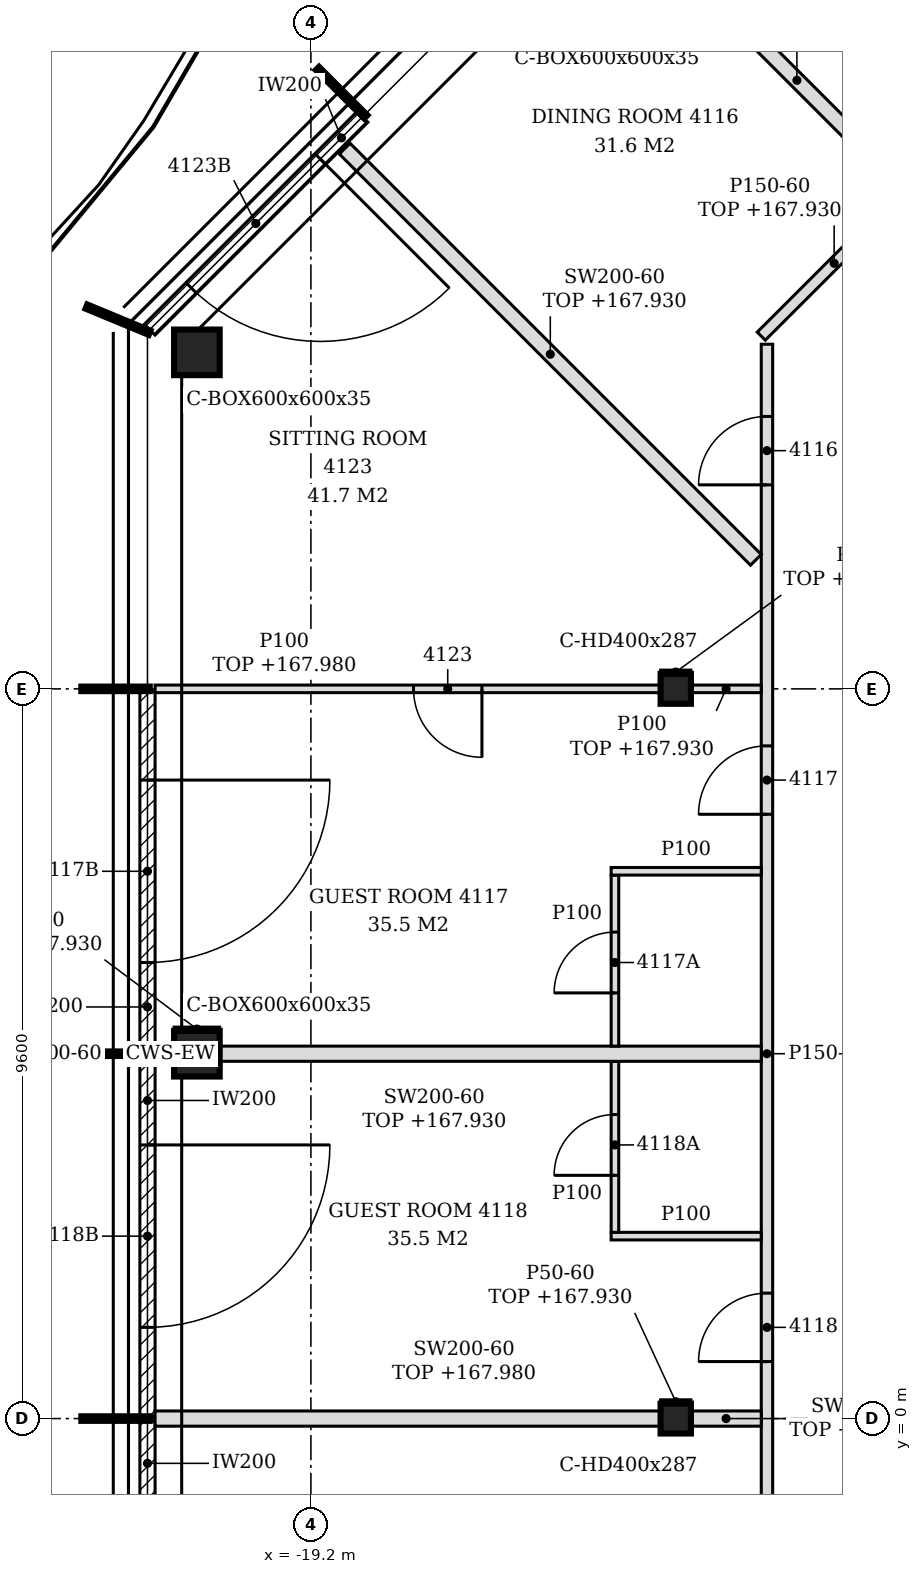
"""IFC4 building model, lengths in metres.
Left out: names, types, materials, properties, quantities, classifications, styles, units other than length and angle.
Written with IfcOpenShell. Run it as: python <this file> out.ifc"""

import sys

from ifc_helpers import new_model, si_unit, direction, frame, frame_2d, origin, origin_2d, place, context, subcontext, project, spatial, polyline, rectangle, hollow_rectangle, i_section, outline, extrude, element, fill, save


model = new_model("IFC4")
c1 = context("Model", 3, precision=1e-05, world=origin(), true_north=direction((0.0, 1.0)))
c2 = subcontext(c1, "Body", "Model", "MODEL_VIEW")
j1 = project(units=[si_unit("LENGTHUNIT", "METRE"), si_unit("PLANEANGLEUNIT", "RADIAN")], contexts=[c1])
p1 = place(None, origin())
s1 = spatial("IfcSite", under=j1, at=p1, CompositionType="ELEMENT")
p2 = place(p1, origin())
s2 = spatial("IfcBuilding", under=s1, at=p2, CompositionType="ELEMENT")
p3 = place(p2, frame((0.0, 0.0, 165.0)))
s3 = spatial("IfcBuildingStorey", under=s2, at=p3, CompositionType="ELEMENT", Elevation=165.0)
for number, where, z_axis, x_axis in (
    (1, (-20.7, 14.027, -0.15), (0.0, 0.0, 1.0), (1.0, 0.0, 0.0)),
    (2, (-20.7, 4.8, -0.15), (0.0, 0.0, 1.0), (1.0, 0.0, 0.0)),
):
    element("IfcColumn", number, at=place(p3, frame(where, z_axis=z_axis, x_axis=x_axis)), inside=s3, PredefinedType="COLUMN", context=c2, shape_type="SweptSolid", body=[
        extrude(hollow_rectangle(XDim=0.6, YDim=0.6, WallThickness=0.035, at=origin_2d()), origin(), (0.0, 0.0, 1.0), 3.6),
    ])
for number, where, z_axis, x_axis in (
    (3, (-14.4, 0.0, -0.15), (0.0, 0.0, 1.0), (1.0, 0.0, 0.0)),
    (4, (-14.4, 9.6, -0.15), (0.0, 0.0, 1.0), (1.0, 0.0, 0.0)),
):
    element("IfcColumn", number, at=place(p3, frame(where, z_axis=z_axis, x_axis=x_axis)), inside=s3, PredefinedType="COLUMN", context=c2, shape_type="SweptSolid", body=[
        extrude(i_section(OverallWidth=0.399, OverallDepth=0.393, WebThickness=0.023, FlangeThickness=0.037, FilletRadius=0.015, at=origin_2d()), origin(), (0.0, 0.0, 1.0), 3.6),
    ])
p4 = place(p3, frame((-18.521, 17.126, 0.0), z_axis=(0.0, 0.0, 1.0), x_axis=(-0.707106781187, -0.707106781187, 0.0)))
e5 = element("IfcWall", 5, at=p4, inside=s3, PredefinedType="NOTDEFINED", context=c2, shape_type="SweptSolid", body=[
    extrude(rectangle(XDim=3.962, YDim=0.2, at=frame_2d((1.981, 0.0))), origin(), (0.0, 0.0, 1.0), 3.45),
])
p5 = place(p4, frame((0.785, 0.0, 0.0)))
e6 = element("IfcOpeningElement", 6, at=p5, cuts=e5, PredefinedType="OPENING", context=c2, shape_type="SweptSolid", body=[
    extrude(rectangle(XDim=2.4, YDim=2.4, at=frame_2d((1.2, 1.2))), frame((0.0, 0.11, 0.0), z_axis=(0.0, -1.0, 0.0), x_axis=(1.0, 0.0, 0.0)), (0.0, 0.0, 1.0), 0.22),
])
p6 = place(p3, frame((-21.35, 9.57, 0.0), z_axis=(0.0, 0.0, 1.0), x_axis=(0.0, -1.0, 0.0)))
e7 = element("IfcWall", 7, at=p6, inside=s3, PredefinedType="NOTDEFINED", context=c2, shape_type="SweptSolid", body=[
    extrude(rectangle(XDim=4.74, YDim=0.2, at=frame_2d((2.37, 0.0))), origin(), (0.0, 0.0, 1.0), 3.45),
])
p7 = place(p6, frame((1.17, 0.0, 0.0)))
e8 = element("IfcOpeningElement", 8, at=p7, cuts=e7, PredefinedType="OPENING", context=c2, shape_type="SweptSolid", body=[
    extrude(rectangle(XDim=2.4, YDim=2.4, at=frame_2d((1.2, 1.2))), frame((0.0, 0.11, 0.0), z_axis=(0.0, -1.0, 0.0), x_axis=(1.0, 0.0, 0.0)), (0.0, 0.0, 1.0), 0.22),
])
p8 = place(p3, frame((-21.35, 4.77, 0.0), z_axis=(0.0, 0.0, 1.0), x_axis=(0.0, -1.0, 0.0)))
e9 = element("IfcWall", 9, at=p8, inside=s3, PredefinedType="NOTDEFINED", context=c2, shape_type="SweptSolid", body=[
    extrude(rectangle(XDim=4.74, YDim=0.2, at=frame_2d((2.37, 0.0))), origin(), (0.0, 0.0, 1.0), 3.45),
])
p9 = place(p8, frame((1.17, 0.0, 0.0)))
e10 = element("IfcOpeningElement", 10, at=p9, cuts=e9, PredefinedType="OPENING", context=c2, shape_type="SweptSolid", body=[
    extrude(rectangle(XDim=2.4, YDim=2.4, at=frame_2d((1.2, 1.2))), frame((0.0, 0.11, 0.0), z_axis=(0.0, -1.0, 0.0), x_axis=(1.0, 0.0, 0.0)), (0.0, 0.0, 1.0), 0.22),
])
p10 = place(p3, frame((-21.35, -0.03, 0.0), z_axis=(0.0, 0.0, 1.0), x_axis=(0.0, -1.0, 0.0)))
e11 = element("IfcWall", 11, at=p10, inside=s3, PredefinedType="NOTDEFINED", context=c2, shape_type="SweptSolid", body=[
    extrude(rectangle(XDim=4.626, YDim=0.2, at=frame_2d((2.313, 0.0))), origin(), (0.0, 0.0, 1.0), 3.45),
])
p11 = place(p10, frame((1.118, 0.0, 0.0)))
e12 = element("IfcOpeningElement", 12, at=p11, cuts=e11, PredefinedType="OPENING", context=c2, shape_type="SweptSolid", body=[
    extrude(rectangle(XDim=2.4, YDim=2.4, at=frame_2d((1.2, 1.2))), frame((0.0, 0.11, 0.0), z_axis=(0.0, -1.0, 0.0), x_axis=(1.0, 0.0, 0.0)), (0.0, 0.0, 1.0), 0.22),
])
p12 = place(p3, frame((-13.2, -3.5, 0.0), z_axis=(0.0, 0.0, 1.0), x_axis=(0.0, 1.0, 0.0)))
e13 = element("IfcWall", 13, at=p12, inside=s3, PredefinedType="PARTITIONING", context=c2, shape_type="SweptSolid", body=[
    extrude(outline(polyline([(0.0, 0.0), (17.634, 0.0), (17.634, 3.45), (13.2, 3.45), (13.198, 2.93), (13.0, 2.93), (12.998, 3.45), (8.4, 3.45), (8.398, 2.93), (8.2, 2.93), (8.198, 3.45), (3.6, 3.45), (3.598, 2.93), (3.4, 2.93), (3.398, 3.45), (0.0, 3.45), (0.0, 0.0)])), frame((0.0, 0.075, 0.0), z_axis=(0.0, -1.0, 0.0), x_axis=(1.0, 0.0, 0.0)), (0.0, 0.0, 1.0), 0.15),
])
p13 = place(p12, frame((15.784, 0.0, 0.0)))
e14 = element("IfcOpeningElement", 14, at=p13, cuts=e13, PredefinedType="OPENING", context=c2, shape_type="SweptSolid", body=[
    extrude(rectangle(XDim=0.9, YDim=2.1, at=frame_2d((0.45, 1.05))), frame((0.0, 0.085, 0.0), z_axis=(0.0, -1.0, 0.0), x_axis=(1.0, 0.0, 0.0)), (0.0, 0.0, 1.0), 0.17),
])
p14 = place(p12, frame((11.45, 0.0, 0.0)))
e15 = element("IfcOpeningElement", 15, at=p14, cuts=e13, PredefinedType="OPENING", context=c2, shape_type="SweptSolid", body=[
    extrude(rectangle(XDim=0.9, YDim=2.1, at=frame_2d((0.45, 1.05))), frame((0.0, 0.085, 0.0), z_axis=(0.0, -1.0, 0.0), x_axis=(1.0, 0.0, 0.0)), (0.0, 0.0, 1.0), 0.17),
])
p15 = place(p12, frame((4.25, 0.0, 0.0)))
e16 = element("IfcOpeningElement", 16, at=p15, cuts=e13, PredefinedType="OPENING", context=c2, shape_type="SweptSolid", body=[
    extrude(rectangle(XDim=0.9, YDim=2.1, at=frame_2d((0.45, 1.05))), frame((0.0, 0.085, 0.0), z_axis=(0.0, -1.0, 0.0), x_axis=(1.0, 0.0, 0.0)), (0.0, 0.0, 1.0), 0.17),
])
p16 = place(p12, frame((1.353, 0.0, 0.0)))
e17 = element("IfcOpeningElement", 17, at=p16, cuts=e13, PredefinedType="OPENING", context=c2, shape_type="SweptSolid", body=[
    extrude(rectangle(XDim=0.9, YDim=2.1, at=frame_2d((0.45, 1.05))), frame((0.0, 0.085, 0.0), z_axis=(0.0, -1.0, 0.0), x_axis=(1.0, 0.0, 0.0)), (0.0, 0.0, 1.0), 0.17),
])
p17 = place(p3, frame((-21.25, 0.0, 0.0), z_axis=(0.0, 0.0, 1.0), x_axis=(1.0, 0.0, 0.0)))
e18 = element("IfcWall", 18, at=p17, inside=s3, PredefinedType="PARTITIONING", context=c2, shape_type="SweptSolid", body=[
    extrude(outline(polyline([(0.0, 0.0), (6.65, 0.0), (6.65, 2.98), (0.7, 2.98), (0.698, 2.93), (0.4, 2.93), (0.398, 2.98), (0.0, 2.98), (0.0, 0.0)])), frame((0.0, 0.1, 0.0), z_axis=(0.0, -1.0, 0.0), x_axis=(1.0, 0.0, 0.0)), (0.0, 0.0, 1.0), 0.2),
])
p18 = place(p3, frame((-14.2, 0.0, 0.0), z_axis=(0.0, 0.0, 1.0), x_axis=(1.0, 0.0, 0.0)))
e19 = element("IfcWall", 19, at=p18, inside=s3, PredefinedType="PARTITIONING", context=c2, shape_type="SweptSolid", body=[
    extrude(rectangle(XDim=0.926, YDim=0.2, at=frame_2d((0.463, 0.0))), origin(), (0.0, 0.0, 1.0), 2.93),
])
p19 = place(p3, frame((-15.25, 2.4, 0.0), z_axis=(0.0, 0.0, 1.0), x_axis=(1.0, 0.0, 0.0)))
e20 = element("IfcWall", 20, at=p19, inside=s3, PredefinedType="PARTITIONING", context=c2, shape_type="SweptSolid", body=[
    extrude(outline(polyline([(0.0, 0.0), (1.975, 0.0), (1.975, 3.45), (1.0, 3.45), (0.998, 2.93), (0.7, 2.93), (0.698, 3.45), (0.0, 3.45), (0.0, 0.0)])), frame((0.0, 0.05, 0.0), z_axis=(0.0, -1.0, 0.0), x_axis=(1.0, 0.0, 0.0)), (0.0, 0.0, 1.0), 0.1),
])
p20 = place(p3, frame((-15.2, 2.45, 0.0), z_axis=(0.0, 0.0, 1.0), x_axis=(0.0, 1.0, 0.0)))
e21 = element("IfcWall", 21, at=p20, inside=s3, PredefinedType="PARTITIONING", context=c2, shape_type="SweptSolid", body=[
    extrude(rectangle(XDim=2.25, YDim=0.1, at=frame_2d((1.125, 0.0))), origin(), (0.0, 0.0, 1.0), 3.45),
])
p21 = place(p20, frame((0.75, 0.0, 0.0)))
e22 = element("IfcOpeningElement", 22, at=p21, cuts=e21, PredefinedType="OPENING", context=c2, shape_type="SweptSolid", body=[
    extrude(rectangle(XDim=0.8, YDim=2.1, at=frame_2d((0.4, 1.05))), frame((0.0, 0.06, 0.0), z_axis=(0.0, -1.0, 0.0), x_axis=(1.0, 0.0, 0.0)), (0.0, 0.0, 1.0), 0.12),
])
p22 = place(p3, frame((-21.25, 4.8, 0.0), z_axis=(0.0, 0.0, 1.0), x_axis=(1.0, 0.0, 0.0)))
e23 = element("IfcWall", 23, at=p22, inside=s3, PredefinedType="PARTITIONING", context=c2, shape_type="SweptSolid", body=[
    extrude(rectangle(XDim=0.25, YDim=0.2, at=frame_2d((0.125, 0.0))), origin(), (0.0, 0.0, 1.0), 3.45),
])
p23 = place(p3, frame((-20.4, 4.8, 0.0), z_axis=(0.0, 0.0, 1.0), x_axis=(1.0, 0.0, 0.0)))
e24 = element("IfcWall", 24, at=p23, inside=s3, PredefinedType="PARTITIONING", context=c2, shape_type="SweptSolid", body=[
    extrude(rectangle(XDim=7.125, YDim=0.2, at=frame_2d((3.562, 0.0))), origin(), (0.0, 0.0, 1.0), 2.93),
])
p24 = place(p3, frame((-15.2, 4.9, 0.0), z_axis=(0.0, 0.0, 1.0), x_axis=(0.0, 1.0, 0.0)))
e25 = element("IfcWall", 25, at=p24, inside=s3, PredefinedType="PARTITIONING", context=c2, shape_type="SweptSolid", body=[
    extrude(rectangle(XDim=2.25, YDim=0.1, at=frame_2d((1.125, 0.0))), origin(), (0.0, 0.0, 1.0), 3.45),
])
p25 = place(p24, frame((0.7, 0.0, 0.0)))
e26 = element("IfcOpeningElement", 26, at=p25, cuts=e25, PredefinedType="OPENING", context=c2, shape_type="SweptSolid", body=[
    extrude(rectangle(XDim=0.8, YDim=2.1, at=frame_2d((0.4, 1.05))), frame((0.0, 0.06, 0.0), z_axis=(0.0, -1.0, 0.0), x_axis=(1.0, 0.0, 0.0)), (0.0, 0.0, 1.0), 0.12),
])
p26 = place(p3, frame((-15.25, 7.2, 0.0), z_axis=(0.0, 0.0, 1.0), x_axis=(1.0, 0.0, 0.0)))
e27 = element("IfcWall", 27, at=p26, inside=s3, PredefinedType="PARTITIONING", context=c2, shape_type="SweptSolid", body=[
    extrude(outline(polyline([(0.0, 0.0), (1.975, 0.0), (1.975, 3.45), (1.0, 3.45), (0.998, 2.93), (0.7, 2.93), (0.698, 3.45), (0.0, 3.45), (0.0, 0.0)])), frame((0.0, 0.05, 0.0), z_axis=(0.0, -1.0, 0.0), x_axis=(1.0, 0.0, 0.0)), (0.0, 0.0, 1.0), 0.1),
])
p27 = place(p3, frame((-21.25, 9.6, 0.0), z_axis=(0.0, 0.0, 1.0), x_axis=(1.0, 0.0, 0.0)))
e28 = element("IfcWall", 28, at=p27, inside=s3, PredefinedType="PARTITIONING", context=c2, shape_type="SweptSolid", body=[
    extrude(outline(polyline([(0.0, 0.0), (6.65, 0.0), (6.65, 2.98), (0.7, 2.98), (0.698, 2.93), (0.4, 2.93), (0.398, 2.98), (0.0, 2.98), (0.0, 0.0)])), frame((0.0, 0.05, 0.0), z_axis=(0.0, -1.0, 0.0), x_axis=(1.0, 0.0, 0.0)), (0.0, 0.0, 1.0), 0.1),
])
p28 = place(p27, frame((3.4, 0.0, 0.0)))
e29 = element("IfcOpeningElement", 29, at=p28, cuts=e28, PredefinedType="OPENING", context=c2, shape_type="SweptSolid", body=[
    extrude(rectangle(XDim=0.9, YDim=2.1, at=frame_2d((0.45, 1.05))), frame((0.0, 0.06, 0.0), z_axis=(0.0, -1.0, 0.0), x_axis=(1.0, 0.0, 0.0)), (0.0, 0.0, 1.0), 0.12),
])
p29 = place(p3, frame((-14.2, 9.6, 0.0), z_axis=(0.0, 0.0, 1.0), x_axis=(1.0, 0.0, 0.0)))
e30 = element("IfcWall", 30, at=p29, inside=s3, PredefinedType="PARTITIONING", context=c2, shape_type="SweptSolid", body=[
    extrude(rectangle(XDim=0.926, YDim=0.1, at=frame_2d((0.463, 0.0))), origin(), (0.0, 0.0, 1.0), 2.93),
])
p30 = place(p3, frame((-13.346, 11.298, 0.0), z_axis=(0.0, 0.0, 1.0), x_axis=(-0.707106781187, 0.707106781187, 0.0)))
e31 = element("IfcWall", 31, at=p30, inside=s3, PredefinedType="PARTITIONING", context=c2, shape_type="SweptSolid", body=[
    extrude(rectangle(XDim=7.65, YDim=0.2, at=frame_2d((3.825, 0.0))), origin(), (0.0, 0.0, 1.0), 2.93),
])
p31 = place(p3, frame((-13.275, 14.24, 0.0), z_axis=(0.0, 0.0, 1.0), x_axis=(0.707286821097, 0.706926695424, 0.0)))
e32 = element("IfcWall", 32, at=p31, inside=s3, PredefinedType="PARTITIONING", context=c2, shape_type="SweptSolid", body=[
    extrude(rectangle(XDim=2.712, YDim=0.15, at=frame_2d((1.356, 0.0))), origin(), (0.0, 0.0, 1.0), 2.93),
])
p32 = place(p3, frame((-11.41, 16.21, 0.0), z_axis=(0.0, 0.0, 1.0), x_axis=(-0.707106781187, 0.707106781187, 0.0)))
e33 = element("IfcWall", 33, at=p32, inside=s3, PredefinedType="PARTITIONING", context=c2, shape_type="SweptSolid", body=[
    extrude(rectangle(XDim=3.948, YDim=0.2, at=frame_2d((1.974, 0.0))), origin(), (0.0, 0.0, 1.0), 2.93),
])
p33 = place(p3, frame((-14.6, 0.221, 0.0), z_axis=(0.0, 0.0, 1.0), x_axis=(1.0, 0.0, 0.0)))
e34 = element("IfcWall", 34, at=p33, inside=s3, PredefinedType="PARTITIONING", context=c2, shape_type="SweptSolid", body=[
    extrude(rectangle(XDim=0.399, YDim=0.05, at=frame_2d((0.2, 0.0))), origin(), (0.0, 0.0, 1.0), 2.93),
])
p34 = place(p3, frame((-21.0, 5.125, 0.0), z_axis=(0.0, 0.0, 1.0), x_axis=(1.0, 0.0, 0.0)))
e35 = element("IfcWall", 35, at=p34, inside=s3, PredefinedType="PARTITIONING", context=c2, shape_type="SweptSolid", body=[
    extrude(rectangle(XDim=0.6, YDim=0.05, at=frame_2d((0.3, 0.0))), origin(), (0.0, 0.0, 1.0), 2.93),
])
p35 = place(p3, frame((-14.6, 9.822, 0.0), z_axis=(0.0, 0.0, 1.0), x_axis=(1.0, 0.0, 0.0)))
e36 = element("IfcWall", 36, at=p35, inside=s3, PredefinedType="PARTITIONING", context=c2, shape_type="SweptSolid", body=[
    extrude(rectangle(XDim=0.399, YDim=0.05, at=frame_2d((0.2, 0.0))), origin(), (0.0, 0.0, 1.0), 2.93),
])
p36 = place(p5, origin())
e37 = element("IfcDoor", 37, at=p36, inside=s3, OperationType="SINGLE_SWING_LEFT", PredefinedType="DOOR", context=c2, shape_type="SweptSolid", body=[
    extrude(rectangle(XDim=2.4, YDim=2.4, at=frame_2d((1.2, 1.2))), frame((0.0, 0.025, 0.0), z_axis=(0.0, -1.0, 0.0), x_axis=(1.0, 0.0, 0.0)), (0.0, 0.0, 1.0), 0.05),
])
fill(e6, e37)
p37 = place(p7, origin())
e38 = element("IfcDoor", 38, at=p37, inside=s3, OperationType="SINGLE_SWING_LEFT", PredefinedType="DOOR", context=c2, shape_type="SweptSolid", body=[
    extrude(rectangle(XDim=2.4, YDim=2.4, at=frame_2d((1.2, 1.2))), frame((0.0, 0.025, 0.0), z_axis=(0.0, -1.0, 0.0), x_axis=(1.0, 0.0, 0.0)), (0.0, 0.0, 1.0), 0.05),
])
fill(e8, e38)
p38 = place(p9, origin())
e39 = element("IfcDoor", 39, at=p38, inside=s3, OperationType="SINGLE_SWING_LEFT", PredefinedType="DOOR", context=c2, shape_type="SweptSolid", body=[
    extrude(rectangle(XDim=2.4, YDim=2.4, at=frame_2d((1.2, 1.2))), frame((0.0, 0.025, 0.0), z_axis=(0.0, -1.0, 0.0), x_axis=(1.0, 0.0, 0.0)), (0.0, 0.0, 1.0), 0.05),
])
fill(e10, e39)
p39 = place(p13, origin())
e40 = element("IfcDoor", 40, at=p39, inside=s3, OperationType="SINGLE_SWING_LEFT", PredefinedType="DOOR", context=c2, shape_type="SweptSolid", body=[
    extrude(rectangle(XDim=0.9, YDim=2.1, at=frame_2d((0.45, 1.05))), frame((0.0, 0.025, 0.0), z_axis=(0.0, -1.0, 0.0), x_axis=(1.0, 0.0, 0.0)), (0.0, 0.0, 1.0), 0.05),
])
fill(e14, e40)
p40 = place(p14, origin())
e41 = element("IfcDoor", 41, at=p40, inside=s3, OperationType="SINGLE_SWING_LEFT", PredefinedType="DOOR", context=c2, shape_type="SweptSolid", body=[
    extrude(rectangle(XDim=0.9, YDim=2.1, at=frame_2d((0.45, 1.05))), frame((0.0, 0.025, 0.0), z_axis=(0.0, -1.0, 0.0), x_axis=(1.0, 0.0, 0.0)), (0.0, 0.0, 1.0), 0.05),
])
fill(e15, e41)
p41 = place(p25, origin())
e42 = element("IfcDoor", 42, at=p41, inside=s3, OperationType="SINGLE_SWING_LEFT", PredefinedType="DOOR", context=c2, shape_type="SweptSolid", body=[
    extrude(rectangle(XDim=0.8, YDim=2.1, at=frame_2d((0.4, 1.05))), frame((0.0, 0.025, 0.0), z_axis=(0.0, -1.0, 0.0), x_axis=(1.0, 0.0, 0.0)), (0.0, 0.0, 1.0), 0.05),
])
fill(e26, e42)
p42 = place(p15, origin())
e43 = element("IfcDoor", 43, at=p42, inside=s3, OperationType="SINGLE_SWING_LEFT", PredefinedType="DOOR", context=c2, shape_type="SweptSolid", body=[
    extrude(rectangle(XDim=0.9, YDim=2.1, at=frame_2d((0.45, 1.05))), frame((0.0, 0.025, 0.0), z_axis=(0.0, -1.0, 0.0), x_axis=(1.0, 0.0, 0.0)), (0.0, 0.0, 1.0), 0.05),
])
fill(e16, e43)
p43 = place(p21, origin())
e44 = element("IfcDoor", 44, at=p43, inside=s3, OperationType="SINGLE_SWING_LEFT", PredefinedType="DOOR", context=c2, shape_type="SweptSolid", body=[
    extrude(rectangle(XDim=0.8, YDim=2.1, at=frame_2d((0.4, 1.05))), frame((0.0, 0.025, 0.0), z_axis=(0.0, -1.0, 0.0), x_axis=(1.0, 0.0, 0.0)), (0.0, 0.0, 1.0), 0.05),
])
fill(e22, e44)
p44 = place(p28, frame((0.9, 0.0, 0.0), z_axis=(0.0, 0.0, 1.0), x_axis=(-1.0, 0.0, 0.0)))
e45 = element("IfcDoor", 45, at=p44, inside=s3, OperationType="SINGLE_SWING_LEFT", PredefinedType="DOOR", context=c2, shape_type="SweptSolid", body=[
    extrude(rectangle(XDim=0.9, YDim=2.1, at=frame_2d((0.45, 1.05))), frame((0.0, 0.025, 0.0), z_axis=(0.0, -1.0, 0.0), x_axis=(1.0, 0.0, 0.0)), (0.0, 0.0, 1.0), 0.05),
])
fill(e29, e45)
save(model, sys.argv[1])
